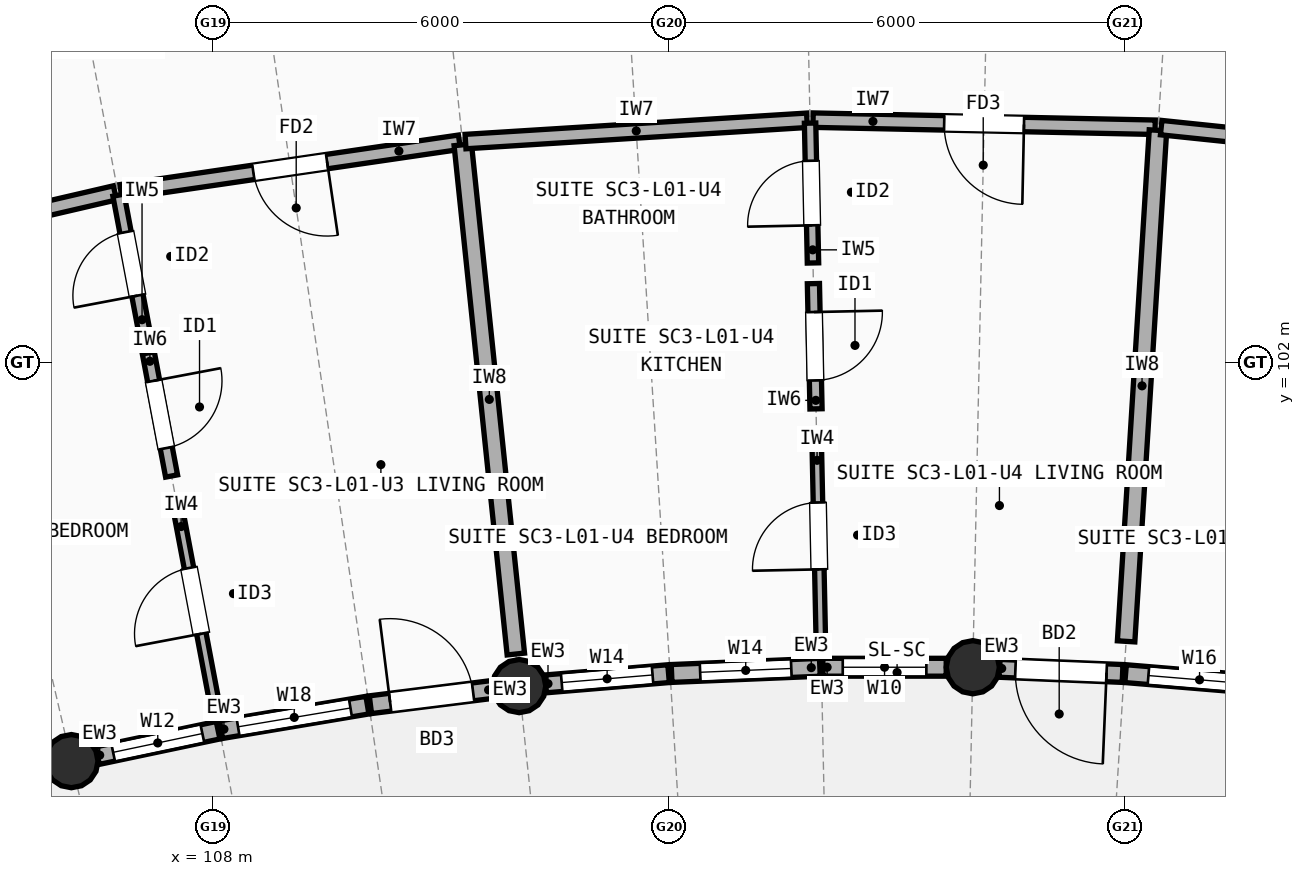
"""IFC4 building model, lengths in metres.
Left out: names, types, materials, properties, quantities, classifications, styles, units other than length and angle.
Written with IfcOpenShell. Run it as: python <this file> out.ifc"""

import sys

from ifc_helpers import new_model, si_unit, direction, frame, frame_2d, origin, origin_2d, place, context, subcontext, project, spatial, rectangle, circle, extrude, element, fill, save


model = new_model("IFC4")
c1 = context("Model", 3, precision=1e-05, world=origin(), true_north=direction((0.0, 1.0)))
c2 = subcontext(c1, "Body", "Model", "MODEL_VIEW")
j1 = project(units=[si_unit("LENGTHUNIT", "METRE"), si_unit("PLANEANGLEUNIT", "RADIAN")], contexts=[c1])
p1 = place(None, origin())
s1 = spatial("IfcSite", under=j1, at=p1, CompositionType="ELEMENT")
p2 = place(p1, origin())
s2 = spatial("IfcBuilding", under=s1, at=p2, CompositionType="ELEMENT")
p3 = place(p2, frame((0.0, 0.0, 4.5)))
s3 = spatial("IfcBuildingStorey", under=s2, at=p3, CompositionType="ELEMENT", Elevation=4.5)
for number, where, z_axis, x_axis in (
    (1, (106.136, 96.754, 0.0), (0.0, 0.0, 1.0), (1.0, 0.0, 0.0)),
    (2, (112.028, 97.742, 0.0), (0.0, 0.0, 1.0), (1.0, 0.0, 0.0)),
    (3, (117.996, 97.99, 0.0), (0.0, 0.0, 1.0), (1.0, 0.0, 0.0)),
):
    element("IfcColumn", number, at=place(p3, frame(where, z_axis=z_axis, x_axis=x_axis)), inside=s3, PredefinedType="COLUMN", context=c2, shape_type="SweptSolid", body=[
        extrude(circle(Radius=0.35, at=origin_2d()), origin(), (0.0, 0.0, 1.0), 2.948),
    ])
p4 = place(p3, frame((106.479, 96.826, 0.0), z_axis=(0.0, 0.0, 1.0), x_axis=(0.978514642092, 0.206177339229, 0.0)))
e4 = element("IfcWall", 4, at=p4, inside=s3, PredefinedType="STANDARD", context=c2, shape_type="SweptSolid", body=[
    extrude(rectangle(XDim=1.622, YDim=0.235, at=frame_2d((0.811, 0.0))), origin(), (0.0, 0.0, 1.0), 2.684),
])
p5 = place(p4, frame((0.211, 0.0, 0.85)))
e5 = element("IfcOpeningElement", 5, at=p5, cuts=e4, PredefinedType="OPENING", context=c2, shape_type="SweptSolid", body=[
    extrude(rectangle(XDim=1.2, YDim=1.35, at=frame_2d((0.6, 0.675))), frame((0.0, 0.127, 0.0), z_axis=(0.0, -1.0, 0.0), x_axis=(1.0, 0.0, 0.0)), (0.0, 0.0, 1.0), 0.255),
])
p6 = place(p3, frame((108.105, 97.168, 0.0), z_axis=(0.0, 0.0, 1.0), x_axis=(0.986241418229, 0.165311418144, 0.0)))
e6 = element("IfcWall", 6, at=p6, inside=s3, PredefinedType="STANDARD", context=c2, shape_type="SweptSolid", body=[
    extrude(rectangle(XDim=1.952, YDim=0.235, at=frame_2d((0.976, 0.0))), origin(), (0.0, 0.0, 1.0), 2.684),
])
p7 = place(p6, frame((0.226, 0.0, 0.85)))
e7 = element("IfcOpeningElement", 7, at=p7, cuts=e6, PredefinedType="OPENING", context=c2, shape_type="SweptSolid", body=[
    extrude(rectangle(XDim=1.5, YDim=1.4, at=frame_2d((0.75, 0.7))), frame((0.0, 0.127, 0.0), z_axis=(0.0, -1.0, 0.0), x_axis=(1.0, 0.0, 0.0)), (0.0, 0.0, 1.0), 0.255),
])
p8 = place(p3, frame((110.071, 97.497, 0.0), z_axis=(0.0, 0.0, 1.0), x_axis=(0.992263980046, 0.124145857376, 0.0)))
e8 = element("IfcWall", 8, at=p8, inside=s3, PredefinedType="STANDARD", context=c2, shape_type="SweptSolid", body=[
    extrude(rectangle(XDim=1.622, YDim=0.235, at=frame_2d((0.811, 0.0))), origin(), (0.0, 0.0, 1.0), 2.684),
])
p9 = place(p8, frame((0.261, 0.0, 0.0)))
e9 = element("IfcOpeningElement", 9, at=p9, cuts=e8, PredefinedType="OPENING", context=c2, shape_type="SweptSolid", body=[
    extrude(rectangle(XDim=1.1, YDim=2.15, at=frame_2d((0.55, 1.075))), frame((0.0, 0.127, 0.0), z_axis=(0.0, -1.0, 0.0), x_axis=(1.0, 0.0, 0.0)), (0.0, 0.0, 1.0), 0.255),
])
p10 = place(p3, frame((112.376, 97.771, 0.0), z_axis=(0.0, 0.0, 1.0), x_axis=(0.996557163732, 0.082908500259, 0.0)))
e10 = element("IfcWall", 10, at=p10, inside=s3, PredefinedType="STANDARD", context=c2, shape_type="SweptSolid", body=[
    extrude(rectangle(XDim=1.623, YDim=0.235, at=frame_2d((0.811, 0.0))), origin(), (0.0, 0.0, 1.0), 2.684),
])
p11 = place(p10, frame((0.211, 0.0, 0.85)))
e11 = element("IfcOpeningElement", 11, at=p11, cuts=e10, PredefinedType="OPENING", context=c2, shape_type="SweptSolid", body=[
    extrude(rectangle(XDim=1.2, YDim=1.5, at=frame_2d((0.6, 0.75))), frame((0.0, 0.127, 0.0), z_axis=(0.0, -1.0, 0.0), x_axis=(1.0, 0.0, 0.0)), (0.0, 0.0, 1.0), 0.255),
])
p12 = place(p3, frame((114.033, 97.908, 0.0), z_axis=(0.0, 0.0, 1.0), x_axis=(0.999132639597, 0.041640947307, 0.0)))
e12 = element("IfcWall", 12, at=p12, inside=s3, PredefinedType="STANDARD", context=c2, shape_type="SweptSolid", body=[
    extrude(rectangle(XDim=1.952, YDim=0.235, at=frame_2d((0.976, 0.0))), origin(), (0.0, 0.0, 1.0), 2.684),
])
p13 = place(p12, frame((0.376, 0.0, 0.85)))
e13 = element("IfcOpeningElement", 13, at=p13, cuts=e12, PredefinedType="OPENING", context=c2, shape_type="SweptSolid", body=[
    extrude(rectangle(XDim=1.2, YDim=1.5, at=frame_2d((0.6, 0.75))), frame((0.0, 0.127, 0.0), z_axis=(0.0, -1.0, 0.0), x_axis=(1.0, 0.0, 0.0)), (0.0, 0.0, 1.0), 0.255),
])
p14 = place(p3, frame((116.024, 97.99, 0.0), z_axis=(0.0, 0.0, 1.0), x_axis=(1.0, 0.0, 0.0)))
e14 = element("IfcWall", 14, at=p14, inside=s3, PredefinedType="STANDARD", context=c2, shape_type="SweptSolid", body=[
    extrude(rectangle(XDim=1.623, YDim=0.235, at=frame_2d((0.811, 0.0))), origin(), (0.0, 0.0, 1.0), 2.684),
])
p15 = place(p14, frame((0.261, 0.0, 0.85)))
e15 = element("IfcOpeningElement", 15, at=p15, cuts=e14, PredefinedType="OPENING", context=c2, shape_type="SweptSolid", body=[
    extrude(rectangle(XDim=1.1, YDim=1.45, at=frame_2d((0.55, 0.725))), frame((0.0, 0.127, 0.0), z_axis=(0.0, -1.0, 0.0), x_axis=(1.0, 0.0, 0.0)), (0.0, 0.0, 1.0), 0.255),
])
p16 = place(p3, frame((118.346, 97.975, 0.0), z_axis=(0.0, 0.0, 1.0), x_axis=(0.999136981031, -0.041536648104, 0.0)))
e16 = element("IfcWall", 16, at=p16, inside=s3, PredefinedType="STANDARD", context=c2, shape_type="SweptSolid", body=[
    extrude(rectangle(XDim=1.622, YDim=0.235, at=frame_2d((0.811, 0.0))), origin(), (0.0, 0.0, 1.0), 2.684),
])
p17 = place(p16, frame((0.211, 0.0, 0.0)))
e17 = element("IfcOpeningElement", 17, at=p17, cuts=e16, PredefinedType="OPENING", context=c2, shape_type="SweptSolid", body=[
    extrude(rectangle(XDim=1.2, YDim=2.15, at=frame_2d((0.6, 1.075))), frame((0.0, 0.127, 0.0), z_axis=(0.0, -1.0, 0.0), x_axis=(1.0, 0.0, 0.0)), (0.0, 0.0, 1.0), 0.255),
])
p18 = place(p3, frame((120.007, 97.905, 0.0), z_axis=(0.0, 0.0, 1.0), x_axis=(0.996557820409, -0.082900606641, 0.0)))
e18 = element("IfcWall", 18, at=p18, inside=s3, PredefinedType="STANDARD", context=c2, shape_type="SweptSolid", body=[
    extrude(rectangle(XDim=1.953, YDim=0.235, at=frame_2d((0.976, 0.0))), origin(), (0.0, 0.0, 1.0), 2.684),
])
p19 = place(p18, frame((0.301, 0.0, 0.85)))
e19 = element("IfcOpeningElement", 19, at=p19, cuts=e18, PredefinedType="OPENING", context=c2, shape_type="SweptSolid", body=[
    extrude(rectangle(XDim=1.35, YDim=1.5, at=frame_2d((0.675, 0.75))), frame((0.0, 0.127, 0.0), z_axis=(0.0, -1.0, 0.0), x_axis=(1.0, 0.0, 0.0)), (0.0, 0.0, 1.0), 0.255),
])
p20 = place(p3, frame((102.325, 103.212, 0.0), z_axis=(0.0, 0.0, 1.0), x_axis=(0.974052809246, 0.226320844821, 0.0)))
e20 = element("IfcWall", 20, at=p20, inside=s3, PredefinedType="SOLIDWALL", context=c2, shape_type="SweptSolid", body=[
    extrude(rectangle(XDim=4.501, YDim=0.19, at=frame_2d((2.251, 0.0))), origin(), (0.0, 0.0, 1.0), 2.722),
])
p21 = place(p3, frame((106.788, 104.246, 0.0), z_axis=(0.0, 0.0, 1.0), x_axis=(0.98946769641, 0.14475385232, 0.0)))
e21 = element("IfcWall", 21, at=p21, inside=s3, PredefinedType="SOLIDWALL", context=c2, shape_type="SweptSolid", body=[
    extrude(rectangle(XDim=4.501, YDim=0.19, at=frame_2d((2.251, 0.0))), origin(), (0.0, 0.0, 1.0), 2.762),
])
p22 = place(p21, frame((1.761, 0.0, 0.0)))
e22 = element("IfcOpeningElement", 22, at=p22, cuts=e21, PredefinedType="OPENING", context=c2, shape_type="SweptSolid", body=[
    extrude(rectangle(XDim=0.98, YDim=2.15, at=frame_2d((0.49, 1.075))), frame((0.0, 0.105, 0.0), z_axis=(0.0, -1.0, 0.0), x_axis=(1.0, 0.0, 0.0)), (0.0, 0.0, 1.0), 0.21),
])
p23 = place(p3, frame((108.025, 97.487, 0.0), z_axis=(0.0, 0.0, 1.0), x_axis=(-0.185725576604, 0.982601653874, 0.0)))
e23 = element("IfcWall", 23, at=p23, inside=s3, PredefinedType="PARTITIONING", context=c2, shape_type="SweptSolid", body=[
    extrude(rectangle(XDim=2.8, YDim=0.125, at=frame_2d((1.4, 0.0))), origin(), (0.0, 0.0, 1.0), 2.742),
])
p24 = place(p23, frame((0.96, 0.0, 0.0)))
e24 = element("IfcOpeningElement", 24, at=p24, cuts=e23, PredefinedType="OPENING", context=c2, shape_type="SweptSolid", body=[
    extrude(rectangle(XDim=0.88, YDim=2.1, at=frame_2d((0.44, 1.05))), frame((0.0, 0.073, 0.0), z_axis=(0.0, -1.0, 0.0), x_axis=(1.0, 0.0, 0.0)), (0.0, 0.0, 1.0), 0.145),
])
p25 = place(p3, frame((107.454, 100.506, 0.0), z_axis=(0.0, 0.0, 1.0), x_axis=(-0.185764109712, 0.98259436979, 0.0)))
e25 = element("IfcWall", 25, at=p25, inside=s3, PredefinedType="PLUMBINGWALL", context=c2, shape_type="SweptSolid", body=[
    extrude(rectangle(XDim=1.648, YDim=0.16, at=frame_2d((0.824, 0.0))), origin(), (0.0, 0.0, 1.0), 2.742),
])
p26 = place(p25, frame((0.374, 0.0, 0.0)))
e26 = element("IfcOpeningElement", 26, at=p26, cuts=e25, PredefinedType="OPENING", context=c2, shape_type="SweptSolid", body=[
    extrude(rectangle(XDim=0.9, YDim=2.1, at=frame_2d((0.45, 1.05))), frame((0.0, 0.09, 0.0), z_axis=(0.0, -1.0, 0.0), x_axis=(1.0, 0.0, 0.0)), (0.0, 0.0, 1.0), 0.18),
])
p27 = place(p3, frame((107.098, 102.392, 0.0), z_axis=(0.0, 0.0, 1.0), x_axis=(-0.185746265255, 0.982597743201, 0.0)))
e27 = element("IfcWall", 27, at=p27, inside=s3, PredefinedType="PARTITIONING", context=c2, shape_type="SweptSolid", body=[
    extrude(rectangle(XDim=1.84, YDim=0.15, at=frame_2d((0.92, 0.0))), origin(), (0.0, 0.0, 1.0), 2.742),
])
p28 = place(p27, frame((0.495, 0.0, 0.0)))
e28 = element("IfcOpeningElement", 28, at=p28, cuts=e27, PredefinedType="OPENING", context=c2, shape_type="SweptSolid", body=[
    extrude(rectangle(XDim=0.85, YDim=2.1, at=frame_2d((0.425, 1.05))), frame((0.0, 0.085, 0.0), z_axis=(0.0, -1.0, 0.0), x_axis=(1.0, 0.0, 0.0)), (0.0, 0.0, 1.0), 0.17),
])
p29 = place(p3, frame((111.984, 98.164, 0.0), z_axis=(0.0, 0.0, 1.0), x_axis=(-0.10362251791, 0.994616696915, 0.0)))
e29 = element("IfcWall", 29, at=p29, inside=s3, PredefinedType="SOLIDWALL", context=c2, shape_type="SweptSolid", body=[
    extrude(rectangle(XDim=6.736, YDim=0.23, at=frame_2d((3.368, 0.0))), origin(), (0.0, 0.0, 1.0), 2.722),
])
p30 = place(p3, frame((111.322, 104.906, 0.0), z_axis=(0.0, 0.0, 1.0), x_axis=(0.998063116084, 0.062209455176, 0.0)))
e30 = element("IfcWall", 30, at=p30, inside=s3, PredefinedType="SOLIDWALL", context=c2, shape_type="SweptSolid", body=[
    extrude(rectangle(XDim=4.501, YDim=0.19, at=frame_2d((2.251, 0.0))), origin(), (0.0, 0.0, 1.0), 2.742),
])
p31 = place(p3, frame((115.894, 105.187, 0.0), z_axis=(0.0, 0.0, 1.0), x_axis=(0.999785356511, -0.020718129879, 0.0)))
e31 = element("IfcWall", 31, at=p31, inside=s3, PredefinedType="SOLIDWALL", context=c2, shape_type="SweptSolid", body=[
    extrude(rectangle(XDim=4.501, YDim=0.19, at=frame_2d((2.251, 0.0))), origin(), (0.0, 0.0, 1.0), 2.722),
])
p32 = place(p31, frame((1.726, 0.0, 0.0)))
e32 = element("IfcOpeningElement", 32, at=p32, cuts=e31, PredefinedType="OPENING", context=c2, shape_type="SweptSolid", body=[
    extrude(rectangle(XDim=1.05, YDim=2.15, at=frame_2d((0.525, 1.075))), frame((0.0, 0.105, 0.0), z_axis=(0.0, -1.0, 0.0), x_axis=(1.0, 0.0, 0.0)), (0.0, 0.0, 1.0), 0.21),
])
p33 = place(p3, frame((115.997, 98.318, 0.0), z_axis=(0.0, 0.0, 1.0), x_axis=(-0.02075255058, 0.999784642633, 0.0)))
e33 = element("IfcWall", 33, at=p33, inside=s3, PredefinedType="PARTITIONING", context=c2, shape_type="SweptSolid", body=[
    extrude(rectangle(XDim=2.8, YDim=0.125, at=frame_2d((1.4, 0.0))), origin(), (0.0, 0.0, 1.0), 2.762),
])
p34 = place(p33, frame((0.96, 0.0, 0.0)))
e34 = element("IfcOpeningElement", 34, at=p34, cuts=e33, PredefinedType="OPENING", context=c2, shape_type="SweptSolid", body=[
    extrude(rectangle(XDim=0.88, YDim=2.1, at=frame_2d((0.44, 1.05))), frame((0.0, 0.073, 0.0), z_axis=(0.0, -1.0, 0.0), x_axis=(1.0, 0.0, 0.0)), (0.0, 0.0, 1.0), 0.145),
])
p35 = place(p3, frame((115.933, 101.389, 0.0), z_axis=(0.0, 0.0, 1.0), x_axis=(-0.020887426075, 0.999781833918, 0.0)))
e35 = element("IfcWall", 35, at=p35, inside=s3, PredefinedType="PLUMBINGWALL", context=c2, shape_type="SweptSolid", body=[
    extrude(rectangle(XDim=1.648, YDim=0.16, at=frame_2d((0.824, 0.0))), origin(), (0.0, 0.0, 1.0), 2.762),
])
p36 = place(p35, frame((0.374, 0.0, 0.0)))
e36 = element("IfcOpeningElement", 36, at=p36, cuts=e35, PredefinedType="OPENING", context=c2, shape_type="SweptSolid", body=[
    extrude(rectangle(XDim=0.9, YDim=2.1, at=frame_2d((0.45, 1.05))), frame((0.0, 0.09, 0.0), z_axis=(0.0, -1.0, 0.0), x_axis=(1.0, 0.0, 0.0)), (0.0, 0.0, 1.0), 0.18),
])
p37 = place(p3, frame((115.893, 103.309, 0.0), z_axis=(0.0, 0.0, 1.0), x_axis=(-0.020698948586, 0.999785753813, 0.0)))
e37 = element("IfcWall", 37, at=p37, inside=s3, PredefinedType="PARTITIONING", context=c2, shape_type="SweptSolid", body=[
    extrude(rectangle(XDim=1.84, YDim=0.15, at=frame_2d((0.92, 0.0))), origin(), (0.0, 0.0, 1.0), 2.762),
])
p38 = place(p37, frame((0.495, 0.0, 0.0)))
e38 = element("IfcOpeningElement", 38, at=p38, cuts=e37, PredefinedType="OPENING", context=c2, shape_type="SweptSolid", body=[
    extrude(rectangle(XDim=0.85, YDim=2.1, at=frame_2d((0.425, 1.05))), frame((0.0, 0.085, 0.0), z_axis=(0.0, -1.0, 0.0), x_axis=(1.0, 0.0, 0.0)), (0.0, 0.0, 1.0), 0.17),
])
p39 = place(p3, frame((120.013, 98.33, 0.0), z_axis=(0.0, 0.0, 1.0), x_axis=(0.062229364488, 0.998061874933, 0.0)))
e39 = element("IfcWall", 39, at=p39, inside=s3, PredefinedType="SOLIDWALL", context=c2, shape_type="SweptSolid", body=[
    extrude(rectangle(XDim=6.736, YDim=0.23, at=frame_2d((3.368, 0.0))), origin(), (0.0, 0.0, 1.0), 2.742),
])
p40 = place(p3, frame((120.475, 105.089, 0.0), z_axis=(0.0, 0.0, 1.0), x_axis=(0.994614565886, -0.103642970468, 0.0)))
e40 = element("IfcWall", 40, at=p40, inside=s3, PredefinedType="SOLIDWALL", context=c2, shape_type="SweptSolid", body=[
    extrude(rectangle(XDim=4.501, YDim=0.19, at=frame_2d((2.251, 0.0))), origin(), (0.0, 0.0, 1.0), 2.762),
])
p41 = place(p5, origin())
e41 = element("IfcWindow", 41, at=p41, inside=s3, PartitioningType="SINGLE_PANEL", PredefinedType="WINDOW", context=c2, shape_type="SweptSolid", body=[
    extrude(rectangle(XDim=1.2, YDim=1.35, at=frame_2d((0.6, 0.675))), frame((0.0, 0.03, 0.0), z_axis=(0.0, -1.0, 0.0), x_axis=(1.0, 0.0, 0.0)), (0.0, 0.0, 1.0), 0.06),
])
fill(e5, e41)
p42 = place(p7, origin())
e42 = element("IfcWindow", 42, at=p42, inside=s3, PartitioningType="SINGLE_PANEL", PredefinedType="WINDOW", context=c2, shape_type="SweptSolid", body=[
    extrude(rectangle(XDim=1.5, YDim=1.4, at=frame_2d((0.75, 0.7))), frame((0.0, 0.03, 0.0), z_axis=(0.0, -1.0, 0.0), x_axis=(1.0, 0.0, 0.0)), (0.0, 0.0, 1.0), 0.06),
])
fill(e7, e42)
p43 = place(p9, frame((1.1, 0.0, 0.0), z_axis=(0.0, 0.0, 1.0), x_axis=(-1.0, 0.0, 0.0)))
e43 = element("IfcDoor", 43, at=p43, inside=s3, OperationType="SINGLE_SWING_LEFT", PredefinedType="DOOR", context=c2, shape_type="SweptSolid", body=[
    extrude(rectangle(XDim=1.1, YDim=2.15, at=frame_2d((0.55, 1.075))), frame((0.0, 0.025, 0.0), z_axis=(0.0, -1.0, 0.0), x_axis=(1.0, 0.0, 0.0)), (0.0, 0.0, 1.0), 0.05),
])
fill(e9, e43)
p44 = place(p11, origin())
e44 = element("IfcWindow", 44, at=p44, inside=s3, PartitioningType="SINGLE_PANEL", PredefinedType="WINDOW", context=c2, shape_type="SweptSolid", body=[
    extrude(rectangle(XDim=1.2, YDim=1.5, at=frame_2d((0.6, 0.75))), frame((0.0, 0.03, 0.0), z_axis=(0.0, -1.0, 0.0), x_axis=(1.0, 0.0, 0.0)), (0.0, 0.0, 1.0), 0.06),
])
fill(e11, e44)
p45 = place(p13, origin())
e45 = element("IfcWindow", 45, at=p45, inside=s3, PartitioningType="SINGLE_PANEL", PredefinedType="WINDOW", context=c2, shape_type="SweptSolid", body=[
    extrude(rectangle(XDim=1.2, YDim=1.5, at=frame_2d((0.6, 0.75))), frame((0.0, 0.03, 0.0), z_axis=(0.0, -1.0, 0.0), x_axis=(1.0, 0.0, 0.0)), (0.0, 0.0, 1.0), 0.06),
])
fill(e13, e45)
p46 = place(p15, origin())
e46 = element("IfcWindow", 46, at=p46, inside=s3, PartitioningType="SINGLE_PANEL", PredefinedType="WINDOW", context=c2, shape_type="SweptSolid", body=[
    extrude(rectangle(XDim=1.1, YDim=1.45, at=frame_2d((0.55, 0.725))), frame((0.0, 0.03, 0.0), z_axis=(0.0, -1.0, 0.0), x_axis=(1.0, 0.0, 0.0)), (0.0, 0.0, 1.0), 0.06),
])
fill(e15, e46)
p47 = place(p17, frame((1.2, 0.0, 0.0), z_axis=(0.0, 0.0, 1.0), x_axis=(-1.0, 0.0, 0.0)))
e47 = element("IfcDoor", 47, at=p47, inside=s3, OperationType="SINGLE_SWING_RIGHT", PredefinedType="DOOR", context=c2, shape_type="SweptSolid", body=[
    extrude(rectangle(XDim=1.2, YDim=2.15, at=frame_2d((0.6, 1.075))), frame((0.0, 0.025, 0.0), z_axis=(0.0, -1.0, 0.0), x_axis=(1.0, 0.0, 0.0)), (0.0, 0.0, 1.0), 0.05),
])
fill(e17, e47)
p48 = place(p19, origin())
e48 = element("IfcWindow", 48, at=p48, inside=s3, PartitioningType="SINGLE_PANEL", PredefinedType="WINDOW", context=c2, shape_type="SweptSolid", body=[
    extrude(rectangle(XDim=1.35, YDim=1.5, at=frame_2d((0.675, 0.75))), frame((0.0, 0.03, 0.0), z_axis=(0.0, -1.0, 0.0), x_axis=(1.0, 0.0, 0.0)), (0.0, 0.0, 1.0), 0.06),
])
fill(e19, e48)
p49 = place(p22, origin())
e49 = element("IfcDoor", 49, at=p49, inside=s3, OperationType="SINGLE_SWING_RIGHT", PredefinedType="DOOR", context=c2, shape_type="SweptSolid", body=[
    extrude(rectangle(XDim=0.98, YDim=2.15, at=frame_2d((0.49, 1.075))), frame((0.0, 0.025, 0.0), z_axis=(0.0, -1.0, 0.0), x_axis=(1.0, 0.0, 0.0)), (0.0, 0.0, 1.0), 0.05),
])
fill(e22, e49)
p50 = place(p24, origin())
e50 = element("IfcDoor", 50, at=p50, inside=s3, OperationType="SINGLE_SWING_LEFT", PredefinedType="DOOR", context=c2, shape_type="SweptSolid", body=[
    extrude(rectangle(XDim=0.88, YDim=2.1, at=frame_2d((0.44, 1.05))), frame((0.0, 0.025, 0.0), z_axis=(0.0, -1.0, 0.0), x_axis=(1.0, 0.0, 0.0)), (0.0, 0.0, 1.0), 0.05),
])
fill(e24, e50)
p51 = place(p26, origin())
e51 = element("IfcDoor", 51, at=p51, inside=s3, OperationType="SINGLE_SWING_RIGHT", PredefinedType="DOOR", context=c2, shape_type="SweptSolid", body=[
    extrude(rectangle(XDim=0.9, YDim=2.1, at=frame_2d((0.45, 1.05))), frame((0.0, 0.025, 0.0), z_axis=(0.0, -1.0, 0.0), x_axis=(1.0, 0.0, 0.0)), (0.0, 0.0, 1.0), 0.05),
])
fill(e26, e51)
p52 = place(p28, origin())
e52 = element("IfcDoor", 52, at=p52, inside=s3, OperationType="SINGLE_SWING_LEFT", PredefinedType="DOOR", context=c2, shape_type="SweptSolid", body=[
    extrude(rectangle(XDim=0.85, YDim=2.1, at=frame_2d((0.425, 1.05))), frame((0.0, 0.025, 0.0), z_axis=(0.0, -1.0, 0.0), x_axis=(1.0, 0.0, 0.0)), (0.0, 0.0, 1.0), 0.05),
])
fill(e28, e52)
p53 = place(p32, origin())
e53 = element("IfcDoor", 53, at=p53, inside=s3, OperationType="SINGLE_SWING_RIGHT", PredefinedType="DOOR", context=c2, shape_type="SweptSolid", body=[
    extrude(rectangle(XDim=1.05, YDim=2.15, at=frame_2d((0.525, 1.075))), frame((0.0, 0.025, 0.0), z_axis=(0.0, -1.0, 0.0), x_axis=(1.0, 0.0, 0.0)), (0.0, 0.0, 1.0), 0.05),
])
fill(e32, e53)
p54 = place(p34, origin())
e54 = element("IfcDoor", 54, at=p54, inside=s3, OperationType="SINGLE_SWING_LEFT", PredefinedType="DOOR", context=c2, shape_type="SweptSolid", body=[
    extrude(rectangle(XDim=0.88, YDim=2.1, at=frame_2d((0.44, 1.05))), frame((0.0, 0.025, 0.0), z_axis=(0.0, -1.0, 0.0), x_axis=(1.0, 0.0, 0.0)), (0.0, 0.0, 1.0), 0.05),
])
fill(e34, e54)
p55 = place(p36, origin())
e55 = element("IfcDoor", 55, at=p55, inside=s3, OperationType="SINGLE_SWING_RIGHT", PredefinedType="DOOR", context=c2, shape_type="SweptSolid", body=[
    extrude(rectangle(XDim=0.9, YDim=2.1, at=frame_2d((0.45, 1.05))), frame((0.0, 0.025, 0.0), z_axis=(0.0, -1.0, 0.0), x_axis=(1.0, 0.0, 0.0)), (0.0, 0.0, 1.0), 0.05),
])
fill(e36, e55)
p56 = place(p38, origin())
e56 = element("IfcDoor", 56, at=p56, inside=s3, OperationType="SINGLE_SWING_LEFT", PredefinedType="DOOR", context=c2, shape_type="SweptSolid", body=[
    extrude(rectangle(XDim=0.85, YDim=2.1, at=frame_2d((0.425, 1.05))), frame((0.0, 0.025, 0.0), z_axis=(0.0, -1.0, 0.0), x_axis=(1.0, 0.0, 0.0)), (0.0, 0.0, 1.0), 0.05),
])
fill(e38, e56)
save(model, sys.argv[1])
